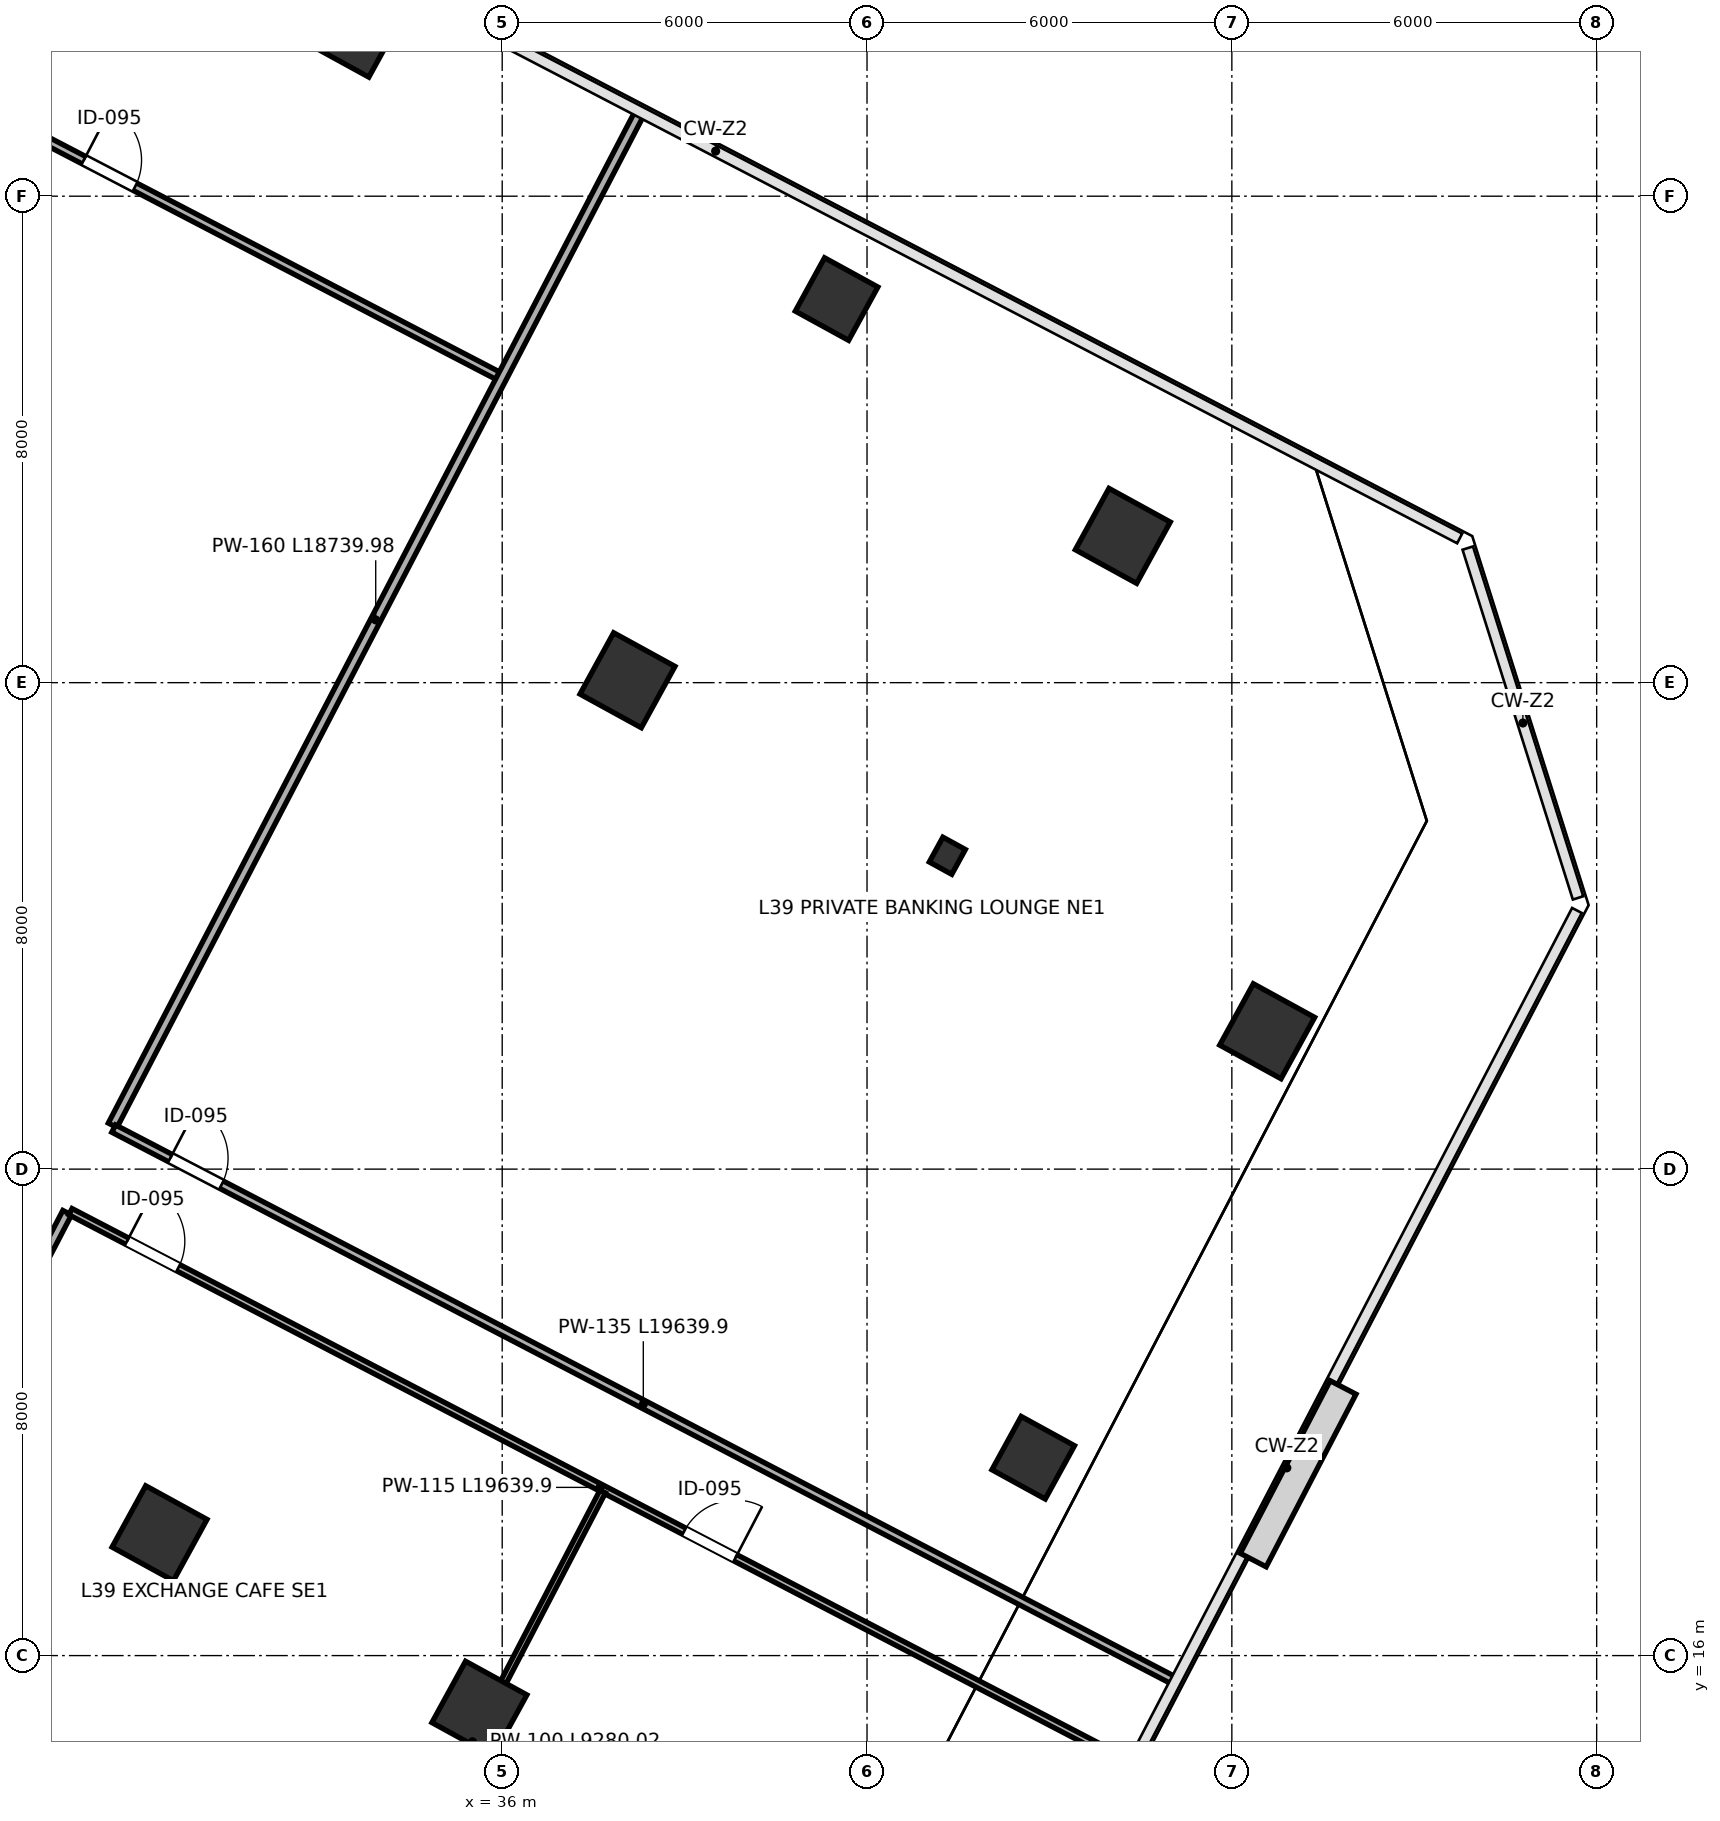
"""IFC4 building model, lengths in metres.
Left out: names, types, materials, properties, quantities, classifications, styles, units other than length and angle.
Written with IfcOpenShell. Run it as: python <this file> out.ifc"""

import sys

from ifc_helpers import new_model, si_unit, direction, frame, frame_2d, origin, origin_2d, place, context, subcontext, project, spatial, rectangle, i_section, extrude, clip, halfspace, source, transform, mapped, element, fill, save


model = new_model("IFC4")
c1 = context("Model", 3, precision=1e-05, world=origin(), true_north=direction((0.0, 1.0)))
c2 = subcontext(c1, "Body", "Model", "MODEL_VIEW")
j1 = project(units=[si_unit("LENGTHUNIT", "METRE"), si_unit("PLANEANGLEUNIT", "RADIAN")], contexts=[c1])
p1 = place(None, origin())
s1 = spatial("IfcSite", under=j1, at=p1, CompositionType="ELEMENT")
p2 = place(p1, origin())
s2 = spatial("IfcBuilding", under=s1, at=p2, CompositionType="ELEMENT")
p3 = place(p2, frame((0.0, 0.0, 175.0)))
s3 = spatial("IfcBuildingStorey", under=s2, at=p3, CompositionType="ELEMENT", Elevation=175.0)
p4 = place(p3, frame((33.609, 42.637, 0.0), z_axis=(0.054393222094, -0.063256015471, 0.996513950679), x_axis=(-0.977264659428, -0.208191259518, 0.040127109214)))
e1 = element("IfcColumn", 1, at=p4, inside=s3, PredefinedType="COLUMN", context=c2, shape_type="Clipping", body=[
    clip(clip(extrude(rectangle(XDim=1.0, YDim=1.0, at=origin_2d()), origin(), (0.0, 0.0, 1.0), 4.215), halfspace(frame((0.0, 0.0, 0.058), z_axis=(0.0, 0.0, -1.0), x_axis=(1.0, 0.0, 0.0)), False)), halfspace(frame((0.0, 0.0, 4.157), z_axis=(0.0, 0.0, 1.0), x_axis=(1.0, 0.0, 0.0)), False)),
])
p5 = place(p3, frame((30.365, 18.012, 0.0), z_axis=(-0.072857964063, -0.045058422926, 0.996323971204), x_axis=(-0.05356759986, 0.997713755824, 0.041204049376)))
e2 = element("IfcColumn", 2, at=p5, inside=s3, PredefinedType="COLUMN", context=c2, shape_type="Clipping", body=[
    clip(clip(extrude(rectangle(XDim=1.15, YDim=1.15, at=origin_2d()), origin(), (0.0, 0.0, 1.0), 4.215), halfspace(frame((0.0, 0.0, 0.068), z_axis=(0.0, 0.0, -1.0), x_axis=(1.0, 0.0, 0.0)), False)), halfspace(frame((0.0, 0.0, 4.147), z_axis=(0.0, 0.0, 1.0), x_axis=(1.0, 0.0, 0.0)), False)),
])
p6 = place(p3, frame((38.06, 32.04, 0.0), z_axis=(-0.000694985386, -0.08571486428, 0.996319466354), x_axis=(-0.872812511022, 0.486311083762, 0.041229242216)))
e3 = element("IfcColumn", 3, at=p6, inside=s3, PredefinedType="COLUMN", context=c2, shape_type="Clipping", body=[
    clip(clip(extrude(rectangle(XDim=1.15, YDim=1.15, at=origin_2d()), origin(), (0.0, 0.0, 1.0), 4.216), halfspace(frame((0.0, 0.0, 0.068), z_axis=(0.0, 0.0, -1.0), x_axis=(1.0, 0.0, 0.0)), False)), halfspace(frame((0.0, 0.0, 4.148), z_axis=(0.0, 0.0, 1.0), x_axis=(1.0, 0.0, 0.0)), False)),
])
p7 = place(p3, frame((41.5, 38.308, 0.0), z_axis=(0.031436475179, -0.103613235287, 0.994120739901), x_axis=(-0.977788289005, 0.203021483384, 0.052080122591)))
e4 = element("IfcColumn", 4, at=p7, inside=s3, PredefinedType="COLUMN", context=c2, shape_type="Clipping", body=[
    clip(clip(extrude(rectangle(XDim=1.0, YDim=1.0, at=origin_2d()), origin(), (0.0, 0.0, 1.0), 4.225), halfspace(frame((0.0, 0.0, 0.075), z_axis=(0.0, 0.0, -1.0), x_axis=(1.0, 0.0, 0.0)), False)), halfspace(frame((0.0, 0.0, 4.15), z_axis=(0.0, 0.0, 1.0), x_axis=(1.0, 0.0, 0.0)), False)),
])
p8 = place(p3, frame((35.625, 15.126, 0.0), z_axis=(-0.08790022673, -0.071960369583, 0.993526675711), x_axis=(-0.185602299854, 0.98110461781, 0.054639868245)))
e5 = element("IfcColumn", 5, at=p8, inside=s3, PredefinedType="COLUMN", context=c2, shape_type="Clipping", body=[
    clip(clip(extrude(rectangle(XDim=1.15, YDim=1.15, at=origin_2d()), origin(), (0.0, 0.0, 1.0), 4.227), halfspace(frame((0.0, 0.0, 0.09), z_axis=(0.0, 0.0, -1.0), x_axis=(1.0, 0.0, 0.0)), False)), halfspace(frame((0.0, 0.0, 4.137), z_axis=(0.0, 0.0, 1.0), x_axis=(1.0, 0.0, 0.0)), False)),
])
p9 = place(p3, frame((43.321, 29.154, 0.0), z_axis=(-0.015939910712, -0.112445674479, 0.993530014412), x_axis=(-0.800976839282, 0.596198056481, 0.054625821562)))
e6 = element("IfcColumn", 6, at=p9, inside=s3, PredefinedType="COLUMN", context=c2, shape_type="Clipping", body=[
    clip(clip(extrude(i_section(OverallWidth=0.421, OverallDepth=0.465, WebThickness=0.045, FlangeThickness=0.072, FilletRadius=0.015, at=origin_2d()), origin(), (0.0, 0.0, 1.0), 4.227), halfspace(frame((0.0, 0.0, 0.036), z_axis=(0.0, 0.0, -1.0), x_axis=(1.0, 0.0, 0.0)), False)), halfspace(frame((0.0, 0.0, 4.192), z_axis=(0.0, 0.0, 1.0), x_axis=(1.0, 0.0, 0.0)), False)),
])
p10 = place(p3, frame((46.207, 34.414, 0.0), z_axis=(0.011011629628, -0.127354397115, 0.99179614919), x_axis=(-0.914561693173, 0.399745612857, 0.061484586537)))
e7 = element("IfcColumn", 7, at=p10, inside=s3, PredefinedType="COLUMN", context=c2, shape_type="Clipping", body=[
    clip(clip(extrude(rectangle(XDim=1.15, YDim=1.15, at=origin_2d()), origin(), (0.0, 0.0, 1.0), 4.235), halfspace(frame((0.0, 0.0, 0.101), z_axis=(0.0, 0.0, -1.0), x_axis=(1.0, 0.0, 0.0)), False)), halfspace(frame((0.0, 0.0, 4.133), z_axis=(0.0, 0.0, 1.0), x_axis=(1.0, 0.0, 0.0)), False)),
])
p11 = place(p3, frame((44.733, 19.254, 0.0), z_axis=(-0.066915065286, -0.118857740749, 0.99065393125), x_axis=(-0.530216325585, 0.845320310072, 0.065606565695)))
e8 = element("IfcColumn", 8, at=p11, inside=s3, PredefinedType="COLUMN", context=c2, shape_type="Clipping", body=[
    clip(clip(extrude(rectangle(XDim=1.0, YDim=1.0, at=origin_2d()), origin(), (0.0, 0.0, 1.0), 4.24), halfspace(frame((0.0, 0.0, 0.094), z_axis=(0.0, 0.0, -1.0), x_axis=(1.0, 0.0, 0.0)), False)), halfspace(frame((0.0, 0.0, 4.145), z_axis=(0.0, 0.0, 1.0), x_axis=(1.0, 0.0, 0.0)), False)),
])
p12 = place(p3, frame((48.581, 26.268, 0.0), z_axis=(-0.031012826298, -0.138896034665, 0.989821244548), x_axis=(-0.751909306924, 0.655703171825, 0.068452499003)))
e9 = element("IfcColumn", 9, at=p12, inside=s3, PredefinedType="COLUMN", context=c2, shape_type="Clipping", body=[
    clip(clip(extrude(rectangle(XDim=1.15, YDim=1.15, at=origin_2d()), origin(), (0.0, 0.0, 1.0), 4.243), halfspace(frame((0.0, 0.0, 0.113), z_axis=(0.0, 0.0, -1.0), x_axis=(1.0, 0.0, 0.0)), False)), halfspace(frame((0.0, 0.0, 4.13), z_axis=(0.0, 0.0, 1.0), x_axis=(1.0, 0.0, 0.0)), False)),
])
p13 = place(p3, frame((11.104, 49.971, 0.0), z_axis=(0.0, 0.0, 1.0), x_axis=(0.887010001249, -0.461750211353, 0.0)))
e10 = element("IfcWall", 10, at=p13, inside=s3, PredefinedType="PARTITIONING", context=c2, shape_type="SweptSolid", body=[
    extrude(rectangle(XDim=28.02, YDim=0.135, at=frame_2d((14.01, 0.0))), origin(), (0.0, 0.0, 1.0), 3.96),
])
p14 = place(p13, frame((20.31, 0.0, 0.0)))
e11 = element("IfcOpeningElement", 11, at=p14, cuts=e10, PredefinedType="OPENING", context=c2, shape_type="SweptSolid", body=[
    extrude(rectangle(XDim=0.95, YDim=2.15, at=frame_2d((0.475, 1.075))), frame((0.0, 0.078, 0.0), z_axis=(0.0, -1.0, 0.0), x_axis=(1.0, 0.0, 0.0)), (0.0, 0.0, 1.0), 0.155),
])
p15 = place(p3, frame((29.593, 24.72, 0.0), z_axis=(0.0, 0.0, 1.0), x_axis=(0.461745249096, 0.88701258443, 0.0)))
e12 = element("IfcWall", 12, at=p15, inside=s3, PredefinedType="PARTITIONING", context=c2, shape_type="SweptSolid", body=[
    extrude(rectangle(XDim=18.74, YDim=0.16, at=frame_2d((9.37, 0.0))), origin(), (0.0, 0.0, 1.0), 3.195),
])
p16 = place(p3, frame((22.528, 11.149, 0.0), z_axis=(0.0, 0.0, 1.0), x_axis=(0.461766825398, 0.887001352289, 0.0)))
e13 = element("IfcWall", 13, at=p16, inside=s3, PredefinedType="PARTITIONING", context=c2, shape_type="SweptSolid", body=[
    extrude(rectangle(XDim=13.68, YDim=0.16, at=frame_2d((6.84, 0.0))), origin(), (0.0, 0.0, 1.0), 3.96),
])
p17 = place(p3, frame((29.61, 24.667, 0.0), z_axis=(0.0, 0.0, 1.0), x_axis=(0.887013798673, -0.461742916527, 0.0)))
e14 = element("IfcWall", 14, at=p17, inside=s3, PredefinedType="PARTITIONING", context=c2, shape_type="SweptSolid", body=[
    extrude(rectangle(XDim=19.64, YDim=0.135, at=frame_2d((9.82, 0.0))), origin(), (0.0, 0.0, 1.0), 3.96),
])
p18 = place(p17, frame((1.05, 0.0, 0.0)))
e15 = element("IfcOpeningElement", 15, at=p18, cuts=e14, PredefinedType="OPENING", context=c2, shape_type="SweptSolid", body=[
    extrude(rectangle(XDim=0.95, YDim=2.15, at=frame_2d((0.475, 1.075))), frame((0.0, 0.078, 0.0), z_axis=(0.0, -1.0, 0.0), x_axis=(1.0, 0.0, 0.0)), (0.0, 0.0, 1.0), 0.155),
])
p19 = place(p3, frame((28.899, 23.301, 0.0), z_axis=(0.0, 0.0, 1.0), x_axis=(0.887006056854, -0.461757788353, 0.0)))
e16 = element("IfcWall", 16, at=p19, inside=s3, PredefinedType="PARTITIONING", context=c2, shape_type="SweptSolid", body=[
    extrude(rectangle(XDim=19.64, YDim=0.115, at=frame_2d((9.82, 0.0))), origin(), (0.0, 0.0, 1.0), 3.96),
])
p20 = place(p19, frame((1.05, 0.0, 0.0)))
e17 = element("IfcOpeningElement", 17, at=p20, cuts=e16, PredefinedType="OPENING", context=c2, shape_type="SweptSolid", body=[
    extrude(rectangle(XDim=0.95, YDim=2.15, at=frame_2d((0.475, 1.075))), frame((0.0, 0.067, 0.0), z_axis=(0.0, -1.0, 0.0), x_axis=(1.0, 0.0, 0.0)), (0.0, 0.0, 1.0), 0.135),
])
p21 = place(p19, frame((11.38, 0.0, 0.0)))
e18 = element("IfcOpeningElement", 18, at=p21, cuts=e16, PredefinedType="OPENING", context=c2, shape_type="SweptSolid", body=[
    extrude(rectangle(XDim=0.95, YDim=2.15, at=frame_2d((0.475, 1.075))), frame((0.0, 0.067, 0.0), z_axis=(0.0, -1.0, 0.0), x_axis=(1.0, 0.0, 0.0)), (0.0, 0.0, 1.0), 0.135),
])
p22 = place(p3, frame((33.368, 10.467, 0.0), z_axis=(0.0, 0.0, 1.0), x_axis=(0.461728758034, 0.887021168859, 0.0)))
e19 = element("IfcWall", 19, at=p22, inside=s3, PredefinedType="PARTITIONING", context=c2, shape_type="SweptSolid", body=[
    extrude(rectangle(XDim=9.28, YDim=0.1, at=frame_2d((4.64, 0.0))), origin(), (0.0, 0.0, 1.0), 3.96),
])
m1 = source(origin(), c2, "Body", "SweptSolid", [
    extrude(rectangle(XDim=0.95, YDim=2.15, at=frame_2d((0.475, 1.075))), frame((0.0, 0.025, 0.0), z_axis=(0.0, -1.0, 0.0), x_axis=(1.0, 0.0, 0.0)), (0.0, 0.0, 1.0), 0.05),
])
p23 = place(p14, origin())
e20 = element("IfcDoor", 20, at=p23, inside=s3, OperationType="SINGLE_SWING_LEFT", PredefinedType="DOOR", context=c2, shape_type="MappedRepresentation", body=[
    mapped(m1, transform((0.0, 0.0, 0.0), scale=1.0)),
])
fill(e11, e20)
p24 = place(p18, origin())
e21 = element("IfcDoor", 21, at=p24, inside=s3, OperationType="SINGLE_SWING_LEFT", PredefinedType="DOOR", context=c2, shape_type="MappedRepresentation", body=[
    mapped(m1, transform((0.0, 0.0, 0.0), scale=1.0)),
])
fill(e15, e21)
p25 = place(p20, origin())
e22 = element("IfcDoor", 22, at=p25, inside=s3, OperationType="SINGLE_SWING_LEFT", PredefinedType="DOOR", context=c2, shape_type="MappedRepresentation", body=[
    mapped(m1, transform((0.0, 0.0, 0.0), scale=1.0)),
])
fill(e17, e22)
p26 = place(p21, origin())
e23 = element("IfcDoor", 23, at=p26, inside=s3, OperationType="SINGLE_SWING_RIGHT", PredefinedType="DOOR", context=c2, shape_type="MappedRepresentation", body=[
    mapped(m1, transform((0.0, 0.0, 0.0), scale=1.0)),
])
fill(e18, e23)
save(model, sys.argv[1])
